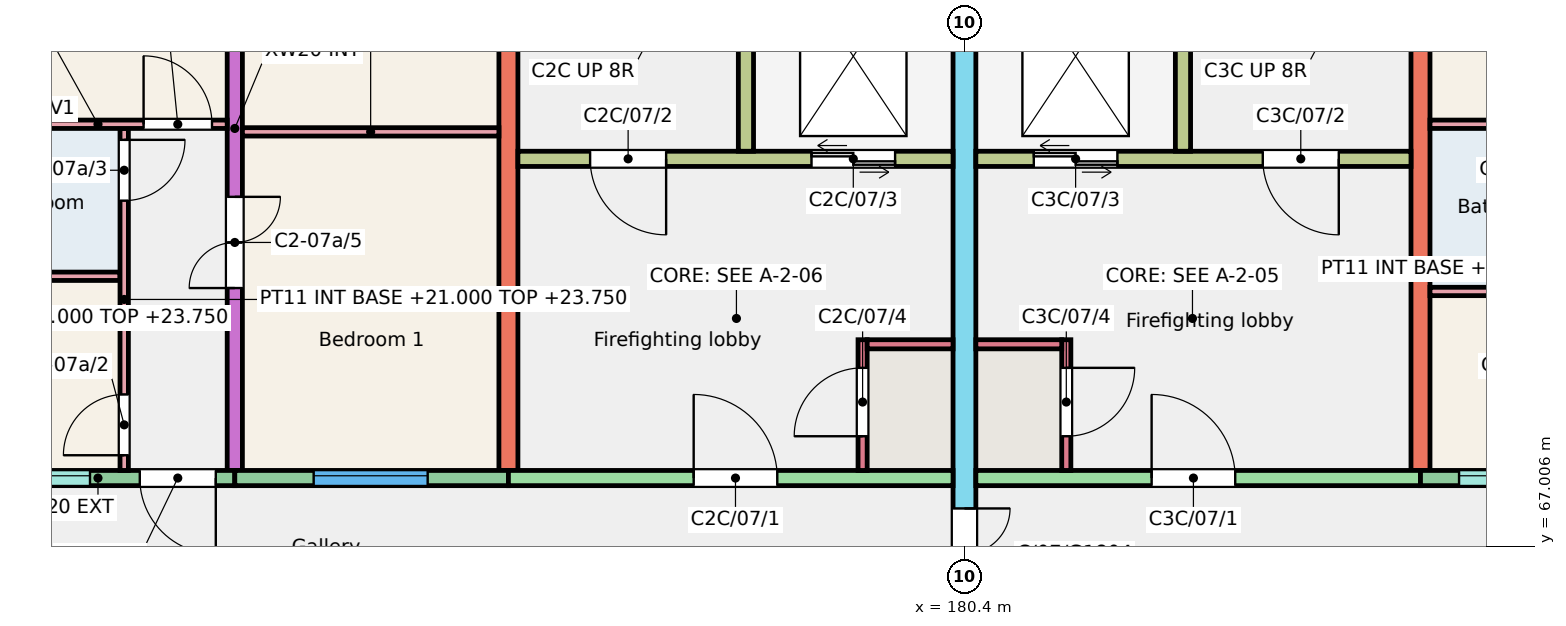
"""IFC4 building model, lengths in metres.
Left out: names, types, materials, properties, quantities, classifications, styles, units other than length and angle.
Written with IfcOpenShell. Run it as: python <this file> out.ifc"""

import sys

from ifc_helpers import new_model, si_unit, direction, frame, frame_2d, origin, place, context, subcontext, project, spatial, rectangle, extrude, element, fill, save


model = new_model("IFC4")
c1 = context("Model", 3, precision=1e-05, world=origin(), true_north=direction((0.0, 1.0)))
c2 = subcontext(c1, "Body", "Model", "MODEL_VIEW")
j1 = project(units=[si_unit("LENGTHUNIT", "METRE"), si_unit("PLANEANGLEUNIT", "RADIAN")], contexts=[c1])
p1 = place(None, origin())
s1 = spatial("IfcSite", under=j1, at=p1, CompositionType="ELEMENT")
p2 = place(p1, origin())
s2 = spatial("IfcBuilding", under=s1, at=p2, CompositionType="ELEMENT")
p3 = place(p2, frame((0.0, 0.0, 21.0)))
s3 = spatial("IfcBuildingStorey", under=s2, at=p3, CompositionType="ELEMENT", Elevation=21.0)
p4 = place(p3, frame((170.8, 68.0, 0.0), z_axis=(0.0, 0.0, 1.0), x_axis=(0.0, 1.0, 0.0)))
e1 = element("IfcWall", 1, at=p4, inside=s3, PredefinedType="SHEAR", context=c2, shape_type="SweptSolid", body=[
    extrude(rectangle(XDim=9.0, YDim=0.2, at=frame_2d((4.5, 0.0))), origin(), (0.0, 0.0, 1.0), 3.0),
])
p5 = place(p4, frame((2.4, 0.0, 0.0)))
e2 = element("IfcOpeningElement", 2, at=p5, cuts=e1, PredefinedType="OPENING", context=c2, shape_type="SweptSolid", body=[
    extrude(rectangle(XDim=1.2, YDim=2.1, at=frame_2d((0.6, 1.05))), frame((0.0, 0.11, 0.0), z_axis=(0.0, -1.0, 0.0), x_axis=(1.0, 0.0, 0.0)), (0.0, 0.0, 1.0), 0.22),
])
p6 = place(p4, frame((6.4, 0.0, 0.0)))
e3 = element("IfcOpeningElement", 3, at=p6, cuts=e1, PredefinedType="OPENING", context=c2, shape_type="SweptSolid", body=[
    extrude(rectangle(XDim=1.2, YDim=2.1, at=frame_2d((0.6, 1.05))), frame((0.0, 0.11, 0.0), z_axis=(0.0, -1.0, 0.0), x_axis=(1.0, 0.0, 0.0)), (0.0, 0.0, 1.0), 0.22),
])
p7 = place(p3, frame((174.4, 68.0, 0.0), z_axis=(0.0, 0.0, 1.0), x_axis=(0.0, 1.0, 0.0)))
e4 = element("IfcWall", 4, at=p7, inside=s3, PredefinedType="SHEAR", context=c2, shape_type="SweptSolid", body=[
    extrude(rectangle(XDim=9.0, YDim=0.25, at=frame_2d((4.5, 0.0))), origin(), (0.0, 0.0, 1.0), 3.0),
])
p8 = place(p3, frame((180.4, 66.0, 0.0), z_axis=(0.0, 0.0, 1.0), x_axis=(0.0, 1.0, 0.0)))
e5 = element("IfcWall", 5, at=p8, inside=s3, PredefinedType="SHEAR", context=c2, shape_type="SweptSolid", body=[
    extrude(rectangle(XDim=11.0, YDim=0.3, at=frame_2d((5.5, 0.0))), origin(), (0.0, 0.0, 1.0), 3.0),
])
p9 = place(p8, frame((0.3, 0.0, 0.0)))
e6 = element("IfcOpeningElement", 6, at=p9, cuts=e5, PredefinedType="OPENING", context=c2, shape_type="SweptSolid", body=[
    extrude(rectangle(XDim=1.2, YDim=2.1, at=frame_2d((0.6, 1.05))), frame((0.0, 0.16, 0.0), z_axis=(0.0, -1.0, 0.0), x_axis=(1.0, 0.0, 0.0)), (0.0, 0.0, 1.0), 0.32),
])
p10 = place(p3, frame((186.4, 68.0, 0.0), z_axis=(0.0, 0.0, 1.0), x_axis=(0.0, 1.0, 0.0)))
e7 = element("IfcWall", 7, at=p10, inside=s3, PredefinedType="SHEAR", context=c2, shape_type="SweptSolid", body=[
    extrude(rectangle(XDim=9.0, YDim=0.25, at=frame_2d((4.5, 0.0))), origin(), (0.0, 0.0, 1.0), 3.0),
])
p11 = place(p3, frame((167.2, 67.9, 0.0), z_axis=(0.0, 0.0, 1.0), x_axis=(1.0, 0.0, 0.0)))
e8 = element("IfcWall", 8, at=p11, inside=s3, PredefinedType="SOLIDWALL", context=c2, shape_type="SweptSolid", body=[
    extrude(rectangle(XDim=3.6, YDim=0.2, at=frame_2d((1.8, 0.0))), origin(), (0.0, 0.0, 1.0), 3.0),
])
p12 = place(p11, frame((0.495, 0.0, 1.1)))
e9 = element("IfcOpeningElement", 9, at=p12, cuts=e8, PredefinedType="OPENING", context=c2, shape_type="SweptSolid", body=[
    extrude(rectangle(XDim=1.2, YDim=1.3, at=frame_2d((0.6, 0.65))), frame((0.0, 0.11, 0.0), z_axis=(0.0, -1.0, 0.0), x_axis=(1.0, 0.0, 0.0)), (0.0, 0.0, 1.0), 0.22),
])
p13 = place(p11, frame((2.35, 0.0, 0.0)))
e10 = element("IfcOpeningElement", 10, at=p13, cuts=e8, PredefinedType="OPENING", context=c2, shape_type="SweptSolid", body=[
    extrude(rectangle(XDim=1.0, YDim=2.1, at=frame_2d((0.5, 1.05))), frame((0.0, 0.11, 0.0), z_axis=(0.0, -1.0, 0.0), x_axis=(1.0, 0.0, 0.0)), (0.0, 0.0, 1.0), 0.22),
])
p14 = place(p3, frame((170.8, 67.9, 0.0), z_axis=(0.0, 0.0, 1.0), x_axis=(1.0, 0.0, 0.0)))
e11 = element("IfcWall", 11, at=p14, inside=s3, PredefinedType="SOLIDWALL", context=c2, shape_type="SweptSolid", body=[
    extrude(rectangle(XDim=3.6, YDim=0.2, at=frame_2d((1.8, 0.0))), origin(), (0.0, 0.0, 1.0), 3.0),
])
p15 = place(p14, frame((1.038, 0.0, 0.9)))
e12 = element("IfcOpeningElement", 12, at=p15, cuts=e11, PredefinedType="OPENING", context=c2, shape_type="SweptSolid", body=[
    extrude(rectangle(XDim=1.5, YDim=1.5, at=frame_2d((0.75, 0.75))), frame((0.0, 0.11, 0.0), z_axis=(0.0, -1.0, 0.0), x_axis=(1.0, 0.0, 0.0)), (0.0, 0.0, 1.0), 0.22),
])
p16 = place(p3, frame((174.4, 67.9, 0.0), z_axis=(0.0, 0.0, 1.0), x_axis=(1.0, 0.0, 0.0)))
e13 = element("IfcWall", 13, at=p16, inside=s3, PredefinedType="SHEAR", context=c2, shape_type="SweptSolid", body=[
    extrude(rectangle(XDim=5.85, YDim=0.2, at=frame_2d((2.925, 0.0))), origin(), (0.0, 0.0, 1.0), 3.0),
])
p17 = place(p16, frame((2.438, 0.0, 0.0)))
e14 = element("IfcOpeningElement", 14, at=p17, cuts=e13, PredefinedType="OPENING", context=c2, shape_type="SweptSolid", body=[
    extrude(rectangle(XDim=1.1, YDim=2.1, at=frame_2d((0.55, 1.05))), frame((0.0, 0.11, 0.0), z_axis=(0.0, -1.0, 0.0), x_axis=(1.0, 0.0, 0.0)), (0.0, 0.0, 1.0), 0.22),
])
p18 = place(p3, frame((174.525, 72.1, 0.0), z_axis=(0.0, 0.0, 1.0), x_axis=(1.0, 0.0, 0.0)))
e15 = element("IfcWall", 15, at=p18, inside=s3, PredefinedType="SHEAR", context=c2, shape_type="SweptSolid", body=[
    extrude(rectangle(XDim=5.725, YDim=0.2, at=frame_2d((2.863, 0.0))), origin(), (0.0, 0.0, 1.0), 3.0),
])
p19 = place(p18, frame((0.95, 0.0, 0.0)))
e16 = element("IfcOpeningElement", 16, at=p19, cuts=e15, PredefinedType="OPENING", context=c2, shape_type="SweptSolid", body=[
    extrude(rectangle(XDim=1.0, YDim=2.1, at=frame_2d((0.5, 1.05))), frame((0.0, 0.11, 0.0), z_axis=(0.0, -1.0, 0.0), x_axis=(1.0, 0.0, 0.0)), (0.0, 0.0, 1.0), 0.22),
])
p20 = place(p18, frame((3.863, 0.0, 0.0)))
e17 = element("IfcOpeningElement", 17, at=p20, cuts=e15, PredefinedType="OPENING", context=c2, shape_type="SweptSolid", body=[
    extrude(rectangle(XDim=1.1, YDim=2.1, at=frame_2d((0.55, 1.05))), frame((0.0, 0.11, 0.0), z_axis=(0.0, -1.0, 0.0), x_axis=(1.0, 0.0, 0.0)), (0.0, 0.0, 1.0), 0.22),
])
p21 = place(p3, frame((177.525, 72.2, 0.0), z_axis=(0.0, 0.0, 1.0), x_axis=(0.0, 1.0, 0.0)))
e18 = element("IfcWall", 18, at=p21, inside=s3, PredefinedType="SHEAR", context=c2, shape_type="SweptSolid", body=[
    extrude(rectangle(XDim=4.8, YDim=0.2, at=frame_2d((2.4, 0.0))), origin(), (0.0, 0.0, 1.0), 3.0),
])
p22 = place(p3, frame((179.06, 68.0, 0.0), z_axis=(0.0, 0.0, 1.0), x_axis=(0.0, 1.0, 0.0)))
e19 = element("IfcWall", 19, at=p22, inside=s3, PredefinedType="SHEAR", context=c2, shape_type="SweptSolid", body=[
    extrude(rectangle(XDim=1.72, YDim=0.12, at=frame_2d((0.86, 0.0))), origin(), (0.0, 0.0, 1.0), 3.0),
])
p23 = place(p22, frame((0.45, 0.0, 0.0)))
e20 = element("IfcOpeningElement", 20, at=p23, cuts=e19, PredefinedType="OPENING", context=c2, shape_type="SweptSolid", body=[
    extrude(rectangle(XDim=0.9, YDim=2.1, at=frame_2d((0.45, 1.05))), frame((0.0, 0.07, 0.0), z_axis=(0.0, -1.0, 0.0), x_axis=(1.0, 0.0, 0.0)), (0.0, 0.0, 1.0), 0.14),
])
p24 = place(p3, frame((179.12, 69.66, 0.0), z_axis=(0.0, 0.0, 1.0), x_axis=(1.0, 0.0, 0.0)))
e21 = element("IfcWall", 21, at=p24, inside=s3, PredefinedType="SHEAR", context=c2, shape_type="SweptSolid", body=[
    extrude(rectangle(XDim=1.13, YDim=0.12, at=frame_2d((0.565, 0.0))), origin(), (0.0, 0.0, 1.0), 3.0),
])
p25 = place(p3, frame((180.55, 67.9, 0.0), z_axis=(0.0, 0.0, 1.0), x_axis=(1.0, 0.0, 0.0)))
e22 = element("IfcWall", 22, at=p25, inside=s3, PredefinedType="SHEAR", context=c2, shape_type="SweptSolid", body=[
    extrude(rectangle(XDim=5.85, YDim=0.2, at=frame_2d((2.925, 0.0))), origin(), (0.0, 0.0, 1.0), 3.0),
])
p26 = place(p25, frame((2.312, 0.0, 0.0)))
e23 = element("IfcOpeningElement", 23, at=p26, cuts=e22, PredefinedType="OPENING", context=c2, shape_type="SweptSolid", body=[
    extrude(rectangle(XDim=1.1, YDim=2.1, at=frame_2d((0.55, 1.05))), frame((0.0, 0.11, 0.0), z_axis=(0.0, -1.0, 0.0), x_axis=(1.0, 0.0, 0.0)), (0.0, 0.0, 1.0), 0.22),
])
p27 = place(p3, frame((180.55, 72.1, 0.0), z_axis=(0.0, 0.0, 1.0), x_axis=(1.0, 0.0, 0.0)))
e24 = element("IfcWall", 24, at=p27, inside=s3, PredefinedType="SHEAR", context=c2, shape_type="SweptSolid", body=[
    extrude(rectangle(XDim=5.725, YDim=0.2, at=frame_2d((2.862, 0.0))), origin(), (0.0, 0.0, 1.0), 3.0),
])
p28 = place(p27, frame((3.775, 0.0, 0.0)))
e25 = element("IfcOpeningElement", 25, at=p28, cuts=e24, PredefinedType="OPENING", context=c2, shape_type="SweptSolid", body=[
    extrude(rectangle(XDim=1.0, YDim=2.1, at=frame_2d((0.5, 1.05))), frame((0.0, 0.11, 0.0), z_axis=(0.0, -1.0, 0.0), x_axis=(1.0, 0.0, 0.0)), (0.0, 0.0, 1.0), 0.22),
])
p29 = place(p27, frame((0.762, 0.0, 0.0)))
e26 = element("IfcOpeningElement", 26, at=p29, cuts=e24, PredefinedType="OPENING", context=c2, shape_type="SweptSolid", body=[
    extrude(rectangle(XDim=1.1, YDim=2.1, at=frame_2d((0.55, 1.05))), frame((0.0, 0.11, 0.0), z_axis=(0.0, -1.0, 0.0), x_axis=(1.0, 0.0, 0.0)), (0.0, 0.0, 1.0), 0.22),
])
p30 = place(p3, frame((183.275, 72.2, 0.0), z_axis=(0.0, 0.0, 1.0), x_axis=(0.0, 1.0, 0.0)))
e27 = element("IfcWall", 27, at=p30, inside=s3, PredefinedType="SHEAR", context=c2, shape_type="SweptSolid", body=[
    extrude(rectangle(XDim=4.8, YDim=0.2, at=frame_2d((2.4, 0.0))), origin(), (0.0, 0.0, 1.0), 3.0),
])
p31 = place(p3, frame((181.74, 68.0, 0.0), z_axis=(0.0, 0.0, 1.0), x_axis=(0.0, 1.0, 0.0)))
e28 = element("IfcWall", 28, at=p31, inside=s3, PredefinedType="SHEAR", context=c2, shape_type="SweptSolid", body=[
    extrude(rectangle(XDim=1.72, YDim=0.12, at=frame_2d((0.86, 0.0))), origin(), (0.0, 0.0, 1.0), 3.0),
])
p32 = place(p31, frame((0.45, 0.0, 0.0)))
e29 = element("IfcOpeningElement", 29, at=p32, cuts=e28, PredefinedType="OPENING", context=c2, shape_type="SweptSolid", body=[
    extrude(rectangle(XDim=0.9, YDim=2.1, at=frame_2d((0.45, 1.05))), frame((0.0, 0.07, 0.0), z_axis=(0.0, -1.0, 0.0), x_axis=(1.0, 0.0, 0.0)), (0.0, 0.0, 1.0), 0.14),
])
p33 = place(p3, frame((180.55, 69.66, 0.0), z_axis=(0.0, 0.0, 1.0), x_axis=(1.0, 0.0, 0.0)))
e30 = element("IfcWall", 30, at=p33, inside=s3, PredefinedType="SHEAR", context=c2, shape_type="SweptSolid", body=[
    extrude(rectangle(XDim=1.13, YDim=0.12, at=frame_2d((0.565, 0.0))), origin(), (0.0, 0.0, 1.0), 3.0),
])
p34 = place(p3, frame((186.4, 67.9, 0.0), z_axis=(0.0, 0.0, 1.0), x_axis=(1.0, 0.0, 0.0)))
e31 = element("IfcWall", 31, at=p34, inside=s3, PredefinedType="SOLIDWALL", context=c2, shape_type="SweptSolid", body=[
    extrude(rectangle(XDim=3.6, YDim=0.2, at=frame_2d((1.8, 0.0))), origin(), (0.0, 0.0, 1.0), 3.0),
])
p35 = place(p34, frame((0.508, 0.0, 1.1)))
e32 = element("IfcOpeningElement", 32, at=p35, cuts=e31, PredefinedType="OPENING", context=c2, shape_type="SweptSolid", body=[
    extrude(rectangle(XDim=1.2, YDim=1.3, at=frame_2d((0.6, 0.65))), frame((0.0, 0.11, 0.0), z_axis=(0.0, -1.0, 0.0), x_axis=(1.0, 0.0, 0.0)), (0.0, 0.0, 1.0), 0.22),
])
p36 = place(p34, frame((2.35, 0.0, 0.0)))
e33 = element("IfcOpeningElement", 33, at=p36, cuts=e31, PredefinedType="OPENING", context=c2, shape_type="SweptSolid", body=[
    extrude(rectangle(XDim=1.0, YDim=2.1, at=frame_2d((0.5, 1.05))), frame((0.0, 0.11, 0.0), z_axis=(0.0, -1.0, 0.0), x_axis=(1.0, 0.0, 0.0)), (0.0, 0.0, 1.0), 0.22),
])
p37 = place(p3, frame((167.3, 70.555, 0.0), z_axis=(0.0, 0.0, 1.0), x_axis=(1.0, 0.0, 0.0)))
e34 = element("IfcWall", 34, at=p37, inside=s3, PredefinedType="PARTITIONING", context=c2, shape_type="SweptSolid", body=[
    extrude(rectangle(XDim=1.99, YDim=0.11, at=frame_2d((0.995, 0.0))), origin(), (0.0, 0.0, 1.0), 2.75),
])
p38 = place(p3, frame((169.345, 68.0, 0.0), z_axis=(0.0, 0.0, 1.0), x_axis=(0.0, 1.0, 0.0)))
e35 = element("IfcWall", 35, at=p38, inside=s3, PredefinedType="PARTITIONING", context=c2, shape_type="SweptSolid", body=[
    extrude(rectangle(XDim=4.5, YDim=0.11, at=frame_2d((2.25, 0.0))), origin(), (0.0, 0.0, 1.0), 2.75),
])
p39 = place(p38, frame((0.2, 0.0, 0.0)))
e36 = element("IfcOpeningElement", 36, at=p39, cuts=e35, PredefinedType="OPENING", context=c2, shape_type="SweptSolid", body=[
    extrude(rectangle(XDim=0.8, YDim=2.1, at=frame_2d((0.4, 1.05))), frame((0.0, 0.065, 0.0), z_axis=(0.0, -1.0, 0.0), x_axis=(1.0, 0.0, 0.0)), (0.0, 0.0, 1.0), 0.13),
])
p40 = place(p38, frame((3.55, 0.0, 0.0)))
e37 = element("IfcOpeningElement", 37, at=p40, cuts=e35, PredefinedType="OPENING", context=c2, shape_type="SweptSolid", body=[
    extrude(rectangle(XDim=0.8, YDim=2.1, at=frame_2d((0.4, 1.05))), frame((0.0, 0.065, 0.0), z_axis=(0.0, -1.0, 0.0), x_axis=(1.0, 0.0, 0.0)), (0.0, 0.0, 1.0), 0.13),
])
p41 = place(p3, frame((167.3, 72.555, 0.0), z_axis=(0.0, 0.0, 1.0), x_axis=(1.0, 0.0, 0.0)))
e38 = element("IfcWall", 38, at=p41, inside=s3, PredefinedType="PARTITIONING", context=c2, shape_type="SweptSolid", body=[
    extrude(rectangle(XDim=3.4, YDim=0.11, at=frame_2d((1.7, 0.0))), origin(), (0.0, 0.0, 1.0), 2.75),
])
p42 = place(p41, frame((2.3, 0.0, 0.0)))
e39 = element("IfcOpeningElement", 39, at=p42, cuts=e38, PredefinedType="OPENING", context=c2, shape_type="SweptSolid", body=[
    extrude(rectangle(XDim=0.9, YDim=2.1, at=frame_2d((0.45, 1.05))), frame((0.0, 0.065, 0.0), z_axis=(0.0, -1.0, 0.0), x_axis=(1.0, 0.0, 0.0)), (0.0, 0.0, 1.0), 0.13),
])
p43 = place(p3, frame((170.9, 72.455, 0.0), z_axis=(0.0, 0.0, 1.0), x_axis=(1.0, 0.0, 0.0)))
e40 = element("IfcWall", 40, at=p43, inside=s3, PredefinedType="PARTITIONING", context=c2, shape_type="SweptSolid", body=[
    extrude(rectangle(XDim=3.375, YDim=0.11, at=frame_2d((1.688, 0.0))), origin(), (0.0, 0.0, 1.0), 2.8),
])
p44 = place(p3, frame((186.525, 70.355, 0.0), z_axis=(0.0, 0.0, 1.0), x_axis=(1.0, 0.0, 0.0)))
e41 = element("IfcWall", 41, at=p44, inside=s3, PredefinedType="PARTITIONING", context=c2, shape_type="SweptSolid", body=[
    extrude(rectangle(XDim=1.965, YDim=0.11, at=frame_2d((0.982, 0.0))), origin(), (0.0, 0.0, 1.0), 2.8),
])
p45 = place(p3, frame((186.525, 72.555, 0.0), z_axis=(0.0, 0.0, 1.0), x_axis=(1.0, 0.0, 0.0)))
e42 = element("IfcWall", 42, at=p45, inside=s3, PredefinedType="PARTITIONING", context=c2, shape_type="SweptSolid", body=[
    extrude(rectangle(XDim=3.375, YDim=0.11, at=frame_2d((1.688, 0.0))), origin(), (0.0, 0.0, 1.0), 2.8),
])
p46 = place(p45, frame((2.275, 0.0, 0.0)))
e43 = element("IfcOpeningElement", 43, at=p46, cuts=e42, PredefinedType="OPENING", context=c2, shape_type="SweptSolid", body=[
    extrude(rectangle(XDim=0.9, YDim=2.1, at=frame_2d((0.45, 1.05))), frame((0.0, 0.065, 0.0), z_axis=(0.0, -1.0, 0.0), x_axis=(1.0, 0.0, 0.0)), (0.0, 0.0, 1.0), 0.13),
])
p47 = place(p15, origin())
e44 = element("IfcWindow", 44, at=p47, inside=s3, PartitioningType="SINGLE_PANEL", PredefinedType="WINDOW", context=c2, shape_type="SweptSolid", body=[
    extrude(rectangle(XDim=1.5, YDim=1.5, at=frame_2d((0.75, 0.75))), frame((0.0, 0.06, 0.0), z_axis=(0.0, -1.0, 0.0), x_axis=(1.0, 0.0, 0.0)), (0.0, 0.0, 1.0), 0.06),
])
fill(e12, e44)
p48 = place(p12, origin())
e45 = element("IfcWindow", 45, at=p48, inside=s3, PartitioningType="SINGLE_PANEL", PredefinedType="WINDOW", context=c2, shape_type="SweptSolid", body=[
    extrude(rectangle(XDim=1.2, YDim=1.3, at=frame_2d((0.6, 0.65))), frame((0.0, 0.06, 0.0), z_axis=(0.0, -1.0, 0.0), x_axis=(1.0, 0.0, 0.0)), (0.0, 0.0, 1.0), 0.06),
])
fill(e9, e45)
p49 = place(p35, origin())
e46 = element("IfcWindow", 46, at=p49, inside=s3, PartitioningType="SINGLE_PANEL", PredefinedType="WINDOW", context=c2, shape_type="SweptSolid", body=[
    extrude(rectangle(XDim=1.2, YDim=1.3, at=frame_2d((0.6, 0.65))), frame((0.0, 0.06, 0.0), z_axis=(0.0, -1.0, 0.0), x_axis=(1.0, 0.0, 0.0)), (0.0, 0.0, 1.0), 0.06),
])
fill(e32, e46)
p50 = place(p13, origin())
e47 = element("IfcDoor", 47, at=p50, inside=s3, OperationType="SINGLE_SWING_RIGHT", PredefinedType="DOOR", context=c2, shape_type="SweptSolid", body=[
    extrude(rectangle(XDim=1.0, YDim=2.1, at=frame_2d((0.5, 1.05))), frame((0.0, 0.025, 0.0), z_axis=(0.0, -1.0, 0.0), x_axis=(1.0, 0.0, 0.0)), (0.0, 0.0, 1.0), 0.05),
])
fill(e10, e47)
p51 = place(p39, origin())
e48 = element("IfcDoor", 48, at=p51, inside=s3, OperationType="SINGLE_SWING_LEFT", PredefinedType="DOOR", context=c2, shape_type="SweptSolid", body=[
    extrude(rectangle(XDim=0.8, YDim=2.1, at=frame_2d((0.4, 1.05))), frame((0.0, 0.025, 0.0), z_axis=(0.0, -1.0, 0.0), x_axis=(1.0, 0.0, 0.0)), (0.0, 0.0, 1.0), 0.05),
])
fill(e36, e48)
p52 = place(p40, origin())
e49 = element("IfcDoor", 49, at=p52, inside=s3, OperationType="SINGLE_SWING_RIGHT", PredefinedType="DOOR", context=c2, shape_type="SweptSolid", body=[
    extrude(rectangle(XDim=0.8, YDim=2.1, at=frame_2d((0.4, 1.05))), frame((0.0, 0.025, 0.0), z_axis=(0.0, -1.0, 0.0), x_axis=(1.0, 0.0, 0.0)), (0.0, 0.0, 1.0), 0.05),
])
fill(e37, e49)
p53 = place(p42, origin())
e50 = element("IfcDoor", 50, at=p53, inside=s3, OperationType="SINGLE_SWING_LEFT", PredefinedType="DOOR", context=c2, shape_type="SweptSolid", body=[
    extrude(rectangle(XDim=0.9, YDim=2.1, at=frame_2d((0.45, 1.05))), frame((0.0, 0.025, 0.0), z_axis=(0.0, -1.0, 0.0), x_axis=(1.0, 0.0, 0.0)), (0.0, 0.0, 1.0), 0.05),
])
fill(e39, e50)
p54 = place(p5, origin())
e51 = element("IfcDoor", 51, at=p54, inside=s3, OperationType="DOUBLE_DOOR_SINGLE_SWING", PredefinedType="DOOR", context=c2, shape_type="SweptSolid", body=[
    extrude(rectangle(XDim=1.2, YDim=2.1, at=frame_2d((0.6, 1.05))), frame((0.0, 0.025, 0.0), z_axis=(0.0, -1.0, 0.0), x_axis=(1.0, 0.0, 0.0)), (0.0, 0.0, 1.0), 0.05),
])
fill(e2, e51)
p55 = place(p17, origin())
e52 = element("IfcDoor", 52, at=p55, inside=s3, OperationType="SINGLE_SWING_LEFT", PredefinedType="DOOR", context=c2, shape_type="SweptSolid", body=[
    extrude(rectangle(XDim=1.1, YDim=2.1, at=frame_2d((0.55, 1.05))), frame((0.0, 0.025, 0.0), z_axis=(0.0, -1.0, 0.0), x_axis=(1.0, 0.0, 0.0)), (0.0, 0.0, 1.0), 0.05),
])
fill(e14, e52)
p56 = place(p19, origin())
e53 = element("IfcDoor", 53, at=p56, inside=s3, OperationType="SINGLE_SWING_RIGHT", PredefinedType="DOOR", context=c2, shape_type="SweptSolid", body=[
    extrude(rectangle(XDim=1.0, YDim=2.1, at=frame_2d((0.5, 1.05))), frame((0.0, 0.025, 0.0), z_axis=(0.0, -1.0, 0.0), x_axis=(1.0, 0.0, 0.0)), (0.0, 0.0, 1.0), 0.05),
])
fill(e16, e53)
p57 = place(p20, origin())
e54 = element("IfcDoor", 54, at=p57, inside=s3, OperationType="DOUBLE_DOOR_SLIDING", PredefinedType="DOOR", context=c2, shape_type="SweptSolid", body=[
    extrude(rectangle(XDim=1.1, YDim=2.1, at=frame_2d((0.55, 1.05))), frame((0.0, 0.025, 0.0), z_axis=(0.0, -1.0, 0.0), x_axis=(1.0, 0.0, 0.0)), (0.0, 0.0, 1.0), 0.05),
])
fill(e17, e54)
p58 = place(p23, origin())
e55 = element("IfcDoor", 55, at=p58, inside=s3, OperationType="SINGLE_SWING_LEFT", PredefinedType="DOOR", context=c2, shape_type="SweptSolid", body=[
    extrude(rectangle(XDim=0.9, YDim=2.1, at=frame_2d((0.45, 1.05))), frame((0.0, 0.025, 0.0), z_axis=(0.0, -1.0, 0.0), x_axis=(1.0, 0.0, 0.0)), (0.0, 0.0, 1.0), 0.05),
])
fill(e20, e55)
p59 = place(p26, origin())
e56 = element("IfcDoor", 56, at=p59, inside=s3, OperationType="SINGLE_SWING_LEFT", PredefinedType="DOOR", context=c2, shape_type="SweptSolid", body=[
    extrude(rectangle(XDim=1.1, YDim=2.1, at=frame_2d((0.55, 1.05))), frame((0.0, 0.025, 0.0), z_axis=(0.0, -1.0, 0.0), x_axis=(1.0, 0.0, 0.0)), (0.0, 0.0, 1.0), 0.05),
])
fill(e23, e56)
p60 = place(p28, origin())
e57 = element("IfcDoor", 57, at=p60, inside=s3, OperationType="SINGLE_SWING_RIGHT", PredefinedType="DOOR", context=c2, shape_type="SweptSolid", body=[
    extrude(rectangle(XDim=1.0, YDim=2.1, at=frame_2d((0.5, 1.05))), frame((0.0, 0.025, 0.0), z_axis=(0.0, -1.0, 0.0), x_axis=(1.0, 0.0, 0.0)), (0.0, 0.0, 1.0), 0.05),
])
fill(e25, e57)
p61 = place(p29, origin())
e58 = element("IfcDoor", 58, at=p61, inside=s3, OperationType="DOUBLE_DOOR_SLIDING", PredefinedType="DOOR", context=c2, shape_type="SweptSolid", body=[
    extrude(rectangle(XDim=1.1, YDim=2.1, at=frame_2d((0.55, 1.05))), frame((0.0, 0.025, 0.0), z_axis=(0.0, -1.0, 0.0), x_axis=(1.0, 0.0, 0.0)), (0.0, 0.0, 1.0), 0.05),
])
fill(e26, e58)
p62 = place(p32, origin())
e59 = element("IfcDoor", 59, at=p62, inside=s3, OperationType="SINGLE_SWING_RIGHT", PredefinedType="DOOR", context=c2, shape_type="SweptSolid", body=[
    extrude(rectangle(XDim=0.9, YDim=2.1, at=frame_2d((0.45, 1.05))), frame((0.0, 0.025, 0.0), z_axis=(0.0, -1.0, 0.0), x_axis=(1.0, 0.0, 0.0)), (0.0, 0.0, 1.0), 0.05),
])
fill(e29, e59)
p63 = place(p9, origin())
e60 = element("IfcDoor", 60, at=p63, inside=s3, OperationType="DOUBLE_DOOR_SINGLE_SWING", PredefinedType="DOOR", context=c2, shape_type="SweptSolid", body=[
    extrude(rectangle(XDim=1.2, YDim=2.1, at=frame_2d((0.6, 1.05))), frame((0.0, 0.025, 0.0), z_axis=(0.0, -1.0, 0.0), x_axis=(1.0, 0.0, 0.0)), (0.0, 0.0, 1.0), 0.05),
])
fill(e6, e60)
save(model, sys.argv[1])
